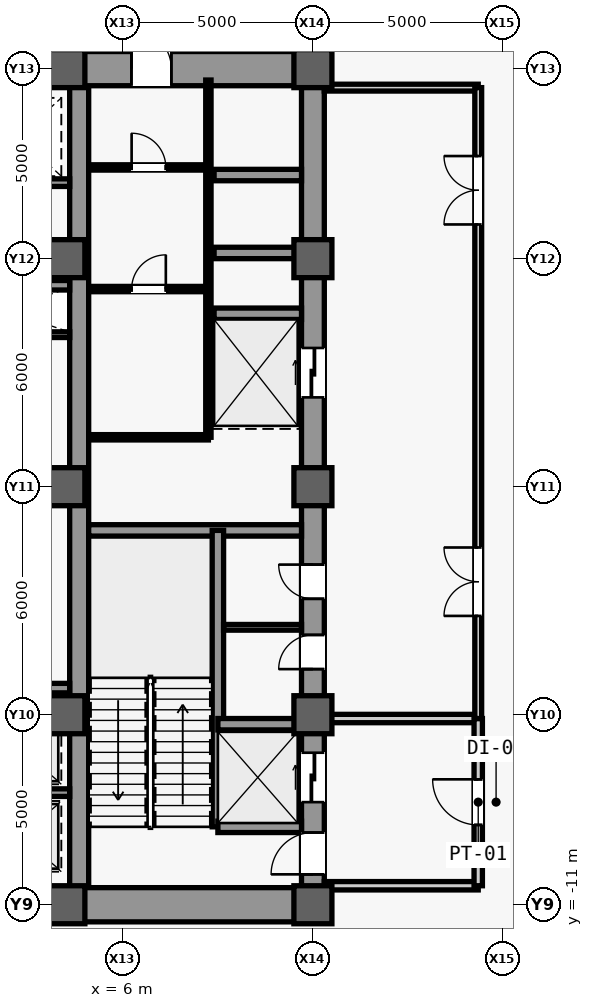
"""IFC4 building model, lengths in metres.
Left out: names, types, materials, properties, quantities, classifications, styles, units other than length and angle.
Written with IfcOpenShell. Run it as: python <this file> out.ifc"""

import sys

from ifc_helpers import new_model, si_unit, direction, frame, frame_2d, origin, origin_2d, place, context, subcontext, project, spatial, rectangle, extrude, source, transform, mapped, element, fill, save


model = new_model("IFC4")
c1 = context("Model", 3, precision=1e-05, world=origin(), true_north=direction((0.0, 1.0)))
c2 = subcontext(c1, "Body", "Model", "MODEL_VIEW")
j1 = project(units=[si_unit("LENGTHUNIT", "METRE"), si_unit("PLANEANGLEUNIT", "RADIAN")], contexts=[c1])
p1 = place(None, origin())
s1 = spatial("IfcSite", under=j1, at=p1, CompositionType="ELEMENT")
p2 = place(p1, origin())
s2 = spatial("IfcBuilding", under=s1, at=p2, CompositionType="ELEMENT")
p3 = place(p2, frame((0.0, 0.0, 12.0)))
s3 = spatial("IfcBuildingStorey", under=s2, at=p3, CompositionType="ELEMENT", Elevation=12.0)
m1 = source(origin(), c2, "Body", "SweptSolid", [
    extrude(rectangle(XDim=22.0, YDim=0.6, at=frame_2d((11.0, 0.0))), origin(), (0.0, 0.0, 1.0), 5.08),
])
p4 = place(p3, frame((11.0, -11.0, 0.0), z_axis=(0.0, 0.0, 1.0), x_axis=(0.0, 1.0, 0.0)))
e1 = element("IfcWall", 1, at=p4, inside=s3, PredefinedType="SHEAR", context=c2, shape_type="MappedRepresentation", body=[
    mapped(m1, transform((0.0, 0.0, 0.0), scale=1.0)),
])
m2 = source(origin(), c2, "Body", "SweptSolid", [
    extrude(rectangle(XDim=1.1, YDim=2.2, at=frame_2d((0.55, 1.1))), frame((0.0, 0.31, 0.0), z_axis=(0.0, -1.0, 0.0), x_axis=(1.0, 0.0, 0.0)), (0.0, 0.0, 1.0), 0.62),
])
p5 = place(p4, frame((0.8, 0.0, 0.0)))
e2 = element("IfcOpeningElement", 2, at=p5, cuts=e1, PredefinedType="OPENING", context=c2, shape_type="MappedRepresentation", body=[
    mapped(m2, transform((0.0, 0.0, 0.0), scale=1.0)),
])
m3 = source(origin(), c2, "Body", "SweptSolid", [
    extrude(rectangle(XDim=0.9, YDim=2.15, at=frame_2d((0.45, 1.075))), frame((0.0, 0.31, 0.0), z_axis=(0.0, -1.0, 0.0), x_axis=(1.0, 0.0, 0.0)), (0.0, 0.0, 1.0), 0.62),
])
p6 = place(p4, frame((6.2, 0.0, 0.0)))
e3 = element("IfcOpeningElement", 3, at=p6, cuts=e1, PredefinedType="OPENING", context=c2, shape_type="MappedRepresentation", body=[
    mapped(m3, transform((0.0, 0.0, 0.0), scale=1.0)),
])
p7 = place(p4, frame((8.05, 0.0, 0.0)))
e4 = element("IfcOpeningElement", 4, at=p7, cuts=e1, PredefinedType="OPENING", context=c2, shape_type="MappedRepresentation", body=[
    mapped(m3, transform((0.0, 0.0, 0.0), scale=1.0)),
])
m4 = source(origin(), c2, "Body", "SweptSolid", [
    extrude(rectangle(XDim=1.3, YDim=2.3, at=frame_2d((0.65, 1.15))), frame((0.0, 0.31, 0.0), z_axis=(0.0, -1.0, 0.0), x_axis=(1.0, 0.0, 0.0)), (0.0, 0.0, 1.0), 0.62),
])
p8 = place(p4, frame((2.7, 0.0, 0.0)))
e5 = element("IfcOpeningElement", 5, at=p8, cuts=e1, PredefinedType="OPENING", context=c2, shape_type="MappedRepresentation", body=[
    mapped(m4, transform((0.0, 0.0, 0.0), scale=1.0)),
])
p9 = place(p4, frame((13.35, 0.0, 0.0)))
e6 = element("IfcOpeningElement", 6, at=p9, cuts=e1, PredefinedType="OPENING", context=c2, shape_type="MappedRepresentation", body=[
    mapped(m4, transform((0.0, 0.0, 0.0), scale=1.0)),
])
m5 = source(origin(), c2, "Body", "SweptSolid", [
    extrude(rectangle(XDim=21.4, YDim=0.5, at=frame_2d((10.7, 0.0))), origin(), (0.0, 0.0, 1.0), 5.08),
])
p10 = place(p3, frame((4.85, -10.7, 0.0), z_axis=(0.0, 0.0, 1.0), x_axis=(0.0, 1.0, 0.0)))
e7 = element("IfcWall", 7, at=p10, inside=s3, PredefinedType="SHEAR", context=c2, shape_type="MappedRepresentation", body=[
    mapped(m5, transform((0.0, 0.0, 0.0), scale=1.0)),
])
m6 = source(origin(), c2, "Body", "SweptSolid", [
    extrude(rectangle(XDim=5.85, YDim=0.9, at=frame_2d((2.925, 0.0))), origin(), (0.0, 0.0, 1.0), 5.08),
])
p11 = place(p3, frame((4.85, -11.0, 0.0), z_axis=(0.0, 0.0, 1.0), x_axis=(1.0, 0.0, 0.0)))
e8 = element("IfcWall", 8, at=p11, inside=s3, PredefinedType="SHEAR", context=c2, shape_type="MappedRepresentation", body=[
    mapped(m6, transform((0.0, 0.0, 0.0), scale=1.0)),
])
p12 = place(p3, frame((4.85, 11.0, 0.0), z_axis=(0.0, 0.0, 1.0), x_axis=(1.0, 0.0, 0.0)))
e9 = element("IfcWall", 9, at=p12, inside=s3, PredefinedType="SHEAR", context=c2, shape_type="MappedRepresentation", body=[
    mapped(m6, transform((0.0, 0.0, 0.0), scale=1.0)),
])
m7 = source(origin(), c2, "Body", "SweptSolid", [
    extrude(rectangle(XDim=1.05, YDim=2.2, at=frame_2d((0.525, 1.1))), frame((0.0, 0.46, 0.0), z_axis=(0.0, -1.0, 0.0), x_axis=(1.0, 0.0, 0.0)), (0.0, 0.0, 1.0), 0.92),
])
p13 = place(p12, frame((1.375, 0.0, 0.0)))
e10 = element("IfcOpeningElement", 10, at=p13, cuts=e9, PredefinedType="OPENING", context=c2, shape_type="MappedRepresentation", body=[
    mapped(m7, transform((0.0, 0.0, 0.0), scale=1.0)),
])
m8 = source(origin(), c2, "Body", "SweptSolid", [
    extrude(rectangle(XDim=5.6, YDim=0.3, at=frame_2d((2.8, 0.0))), origin(), (0.0, 0.0, 1.0), 5.08),
])
p14 = place(p3, frame((5.1, -1.15, 0.0), z_axis=(0.0, 0.0, 1.0), x_axis=(1.0, 0.0, 0.0)))
e11 = element("IfcWall", 11, at=p14, inside=s3, PredefinedType="SHEAR", context=c2, shape_type="MappedRepresentation", body=[
    mapped(m8, transform((0.0, 0.0, 0.0), scale=1.0)),
])
m9 = source(origin(), c2, "Body", "SweptSolid", [
    extrude(rectangle(XDim=9.2, YDim=0.5, at=frame_2d((4.6, 0.0))), origin(), (0.0, 0.0, 1.0), 5.08),
])
p15 = place(p3, frame((-4.6, -11.0, 0.0), z_axis=(0.0, 0.0, 1.0), x_axis=(1.0, 0.0, 0.0)))
e12 = element("IfcWall", 12, at=p15, inside=s3, PredefinedType="SHEAR", context=c2, shape_type="MappedRepresentation", body=[
    mapped(m9, transform((0.0, 0.0, 0.0), scale=1.0)),
])
m10 = source(origin(), c2, "Body", "SweptSolid", [
    extrude(rectangle(XDim=1.8, YDim=2.25, at=frame_2d((0.9, 1.125))), frame((0.0, 0.26, 0.0), z_axis=(0.0, -1.0, 0.0), x_axis=(1.0, 0.0, 0.0)), (0.0, 0.0, 1.0), 0.52),
])
p16 = place(p15, frame((3.7, 0.0, 0.0)))
e13 = element("IfcOpeningElement", 13, at=p16, cuts=e12, PredefinedType="OPENING", context=c2, shape_type="MappedRepresentation", body=[
    mapped(m10, transform((0.0, 0.0, 0.0), scale=1.0)),
])
p17 = place(p3, frame((-4.6, 11.0, 0.0), z_axis=(0.0, 0.0, 1.0), x_axis=(1.0, 0.0, 0.0)))
e14 = element("IfcWall", 14, at=p17, inside=s3, PredefinedType="SHEAR", context=c2, shape_type="MappedRepresentation", body=[
    mapped(m9, transform((0.0, 0.0, 0.0), scale=1.0)),
])
p18 = place(p17, frame((3.7, 0.0, 0.0)))
e15 = element("IfcOpeningElement", 15, at=p18, cuts=e14, PredefinedType="OPENING", context=c2, shape_type="MappedRepresentation", body=[
    mapped(m10, transform((0.0, 0.0, 0.0), scale=1.0)),
])
m11 = source(origin(), c2, "Body", "SweptSolid", [
    extrude(rectangle(XDim=1.0, YDim=1.0, at=origin_2d()), origin(), (0.0, 0.0, 1.0), 5.4),
])
for number, where, z_axis, x_axis in (
    (16, (4.5, -11.0, 0.0), (0.0, 0.0, 1.0), (1.0, 0.0, 0.0)),
    (17, (4.5, -6.0, 0.0), (0.0, 0.0, 1.0), (1.0, 0.0, 0.0)),
    (18, (4.5, 0.0, 0.0), (0.0, 0.0, 1.0), (1.0, 0.0, 0.0)),
    (19, (4.5, 6.0, 0.0), (0.0, 0.0, 1.0), (1.0, 0.0, 0.0)),
    (20, (4.5, 11.0, 0.0), (0.0, 0.0, 1.0), (1.0, 0.0, 0.0)),
    (21, (11.0, -11.0, 0.0), (0.0, 0.0, 1.0), (1.0, 0.0, 0.0)),
    (22, (11.0, -6.0, 0.0), (0.0, 0.0, 1.0), (1.0, 0.0, 0.0)),
    (23, (11.0, 0.0, 0.0), (0.0, 0.0, 1.0), (1.0, 0.0, 0.0)),
    (24, (11.0, 6.0, 0.0), (0.0, 0.0, 1.0), (1.0, 0.0, 0.0)),
    (25, (11.0, 11.0, 0.0), (0.0, 0.0, 1.0), (1.0, 0.0, 0.0)),
):
    element("IfcColumn", number, at=place(p3, frame(where, z_axis=z_axis, x_axis=x_axis)), inside=s3, PredefinedType="COLUMN", context=c2, shape_type="MappedRepresentation", body=[
        mapped(m11, transform((0.0, 0.0, 0.0), scale=1.0)),
    ])
m12 = source(origin(), c2, "Body", "SweptSolid", [
    extrude(rectangle(XDim=7.8, YDim=0.3, at=frame_2d((3.9, 0.0))), origin(), (0.0, 0.0, 1.0), 5.08),
])
p19 = place(p3, frame((8.5, -8.95, 0.0), z_axis=(0.0, 0.0, 1.0), x_axis=(0.0, 1.0, 0.0)))
e26 = element("IfcWall", 26, at=p19, inside=s3, PredefinedType="SHEAR", context=c2, shape_type="MappedRepresentation", body=[
    mapped(m12, transform((0.0, 0.0, 0.0), scale=1.0)),
])
m13 = source(origin(), c2, "Body", "SweptSolid", [
    extrude(rectangle(XDim=2.2, YDim=0.3, at=frame_2d((1.1, 0.0))), origin(), (0.0, 0.0, 1.0), 5.08),
])
for number, where, z_axis, x_axis in (
    (27, (8.5, -8.95, 0.0), (0.0, 0.0, 1.0), (1.0, 0.0, 0.0)),
    (28, (8.5, -6.25, 0.0), (0.0, 0.0, 1.0), (1.0, 0.0, 0.0)),
):
    element("IfcWall", number, at=place(p3, frame(where, z_axis=z_axis, x_axis=x_axis)), inside=s3, PredefinedType="SHEAR", context=c2, shape_type="MappedRepresentation", body=[
        mapped(m13, transform((0.0, 0.0, 0.0), scale=1.0)),
    ])
m14 = source(origin(), c2, "Body", "SweptSolid", [
    extrude(rectangle(XDim=2.3, YDim=0.3, at=frame_2d((1.15, 0.0))), origin(), (0.0, 0.0, 1.0), 5.08),
])
for number, where, z_axis, x_axis in (
    (29, (8.4, 4.55, 0.0), (0.0, 0.0, 1.0), (1.0, 0.0, 0.0)),
    (30, (8.4, 6.15, 0.0), (0.0, 0.0, 1.0), (1.0, 0.0, 0.0)),
    (31, (8.4, 8.2, 0.0), (0.0, 0.0, 1.0), (1.0, 0.0, 0.0)),
):
    element("IfcWall", number, at=place(p3, frame(where, z_axis=z_axis, x_axis=x_axis)), inside=s3, PredefinedType="SHEAR", context=c2, shape_type="MappedRepresentation", body=[
        mapped(m14, transform((0.0, 0.0, 0.0), scale=1.0)),
    ])
m15 = source(origin(), c2, "Body", "SweptSolid", [
    extrude(rectangle(XDim=2.05, YDim=0.15, at=frame_2d((1.025, 0.0))), origin(), (0.0, 0.0, 1.0), 5.08),
])
p20 = place(p3, frame((8.65, -3.7, 0.0), z_axis=(0.0, 0.0, 1.0), x_axis=(1.0, 0.0, 0.0)))
e32 = element("IfcWall", 32, at=p20, inside=s3, PredefinedType="PARTITIONING", context=c2, shape_type="MappedRepresentation", body=[
    mapped(m15, transform((0.0, 0.0, 0.0), scale=1.0)),
])
m16 = source(origin(), c2, "Body", "SweptSolid", [
    extrude(rectangle(XDim=9.4, YDim=0.14, at=frame_2d((4.7, 0.0))), origin(), (0.0, 0.0, 1.0), 5.08),
])
p21 = place(p3, frame((8.25, 1.3, 0.0), z_axis=(0.0, 0.0, 1.0), x_axis=(0.0, 1.0, 0.0)))
e33 = element("IfcWall", 33, at=p21, inside=s3, PredefinedType="PARTITIONING", context=c2, shape_type="MappedRepresentation", body=[
    mapped(m16, transform((0.0, 0.0, 0.0), scale=1.0)),
])
m17 = source(origin(), c2, "Body", "SweptSolid", [
    extrude(rectangle(XDim=3.15, YDim=0.14, at=frame_2d((1.575, 0.0))), origin(), (0.0, 0.0, 1.0), 5.08),
])
p22 = place(p3, frame((5.1, 1.3, 0.0), z_axis=(0.0, 0.0, 1.0), x_axis=(1.0, 0.0, 0.0)))
e34 = element("IfcWall", 34, at=p22, inside=s3, PredefinedType="PARTITIONING", context=c2, shape_type="MappedRepresentation", body=[
    mapped(m17, transform((0.0, 0.0, 0.0), scale=1.0)),
])
p23 = place(p3, frame((5.1, 8.4, 0.0), z_axis=(0.0, 0.0, 1.0), x_axis=(1.0, 0.0, 0.0)))
e35 = element("IfcWall", 35, at=p23, inside=s3, PredefinedType="PARTITIONING", context=c2, shape_type="MappedRepresentation", body=[
    mapped(m17, transform((0.0, 0.0, 0.0), scale=1.0)),
])
m18 = source(origin(), c2, "Body", "SweptSolid", [
    extrude(rectangle(XDim=0.9, YDim=2.15, at=frame_2d((0.45, 1.075))), frame((0.0, 0.08, 0.0), z_axis=(0.0, -1.0, 0.0), x_axis=(1.0, 0.0, 0.0)), (0.0, 0.0, 1.0), 0.16),
])
p24 = place(p23, frame((1.13, 0.0, 0.0)))
e36 = element("IfcOpeningElement", 36, at=p24, cuts=e35, PredefinedType="OPENING", context=c2, shape_type="MappedRepresentation", body=[
    mapped(m18, transform((0.0, 0.0, 0.0), scale=1.0)),
])
p25 = place(p3, frame((5.1, 5.2, 0.0), z_axis=(0.0, 0.0, 1.0), x_axis=(1.0, 0.0, 0.0)))
e37 = element("IfcWall", 37, at=p25, inside=s3, PredefinedType="PARTITIONING", context=c2, shape_type="MappedRepresentation", body=[
    mapped(m17, transform((0.0, 0.0, 0.0), scale=1.0)),
])
p26 = place(p25, frame((1.13, 0.0, 0.0)))
e38 = element("IfcOpeningElement", 38, at=p26, cuts=e37, PredefinedType="OPENING", context=c2, shape_type="MappedRepresentation", body=[
    mapped(m18, transform((0.0, 0.0, 0.0), scale=1.0)),
])
m19 = source(origin(), c2, "Body", "SweptSolid", [
    extrude(rectangle(XDim=4.05, YDim=0.22, at=frame_2d((2.025, 0.0))), origin(), (0.0, 0.0, 1.0), 5.08),
])
for number, where, z_axis, x_axis in (
    (39, (11.3, -10.5, 0.0), (0.0, 0.0, 1.0), (1.0, 0.0, 0.0)),
    (40, (11.3, -6.1, 0.0), (0.0, 0.0, 1.0), (1.0, 0.0, 0.0)),
):
    element("IfcWall", number, at=place(p3, frame(where, z_axis=z_axis, x_axis=x_axis)), inside=s3, PredefinedType="PARTITIONING", context=c2, shape_type="MappedRepresentation", body=[
        mapped(m19, transform((0.0, 0.0, 0.0), scale=1.0)),
    ])
m20 = source(origin(), c2, "Body", "SweptSolid", [
    extrude(rectangle(XDim=4.4, YDim=0.22, at=frame_2d((2.2, 0.0))), origin(), (0.0, 0.0, 1.0), 5.08),
])
p27 = place(p3, frame((15.35, -10.5, 0.0), z_axis=(0.0, 0.0, 1.0), x_axis=(0.0, 1.0, 0.0)))
e41 = element("IfcWall", 41, at=p27, inside=s3, PredefinedType="PARTITIONING", context=c2, shape_type="MappedRepresentation", body=[
    mapped(m20, transform((0.0, 0.0, 0.0), scale=1.0)),
])
m21 = source(origin(), c2, "Body", "SweptSolid", [
    extrude(rectangle(XDim=1.2, YDim=2.2, at=frame_2d((0.6, 1.1))), frame((0.0, 0.12, 0.0), z_axis=(0.0, -1.0, 0.0), x_axis=(1.0, 0.0, 0.0)), (0.0, 0.0, 1.0), 0.24),
])
p28 = place(p27, frame((1.6, 0.0, 0.0)))
e42 = element("IfcOpeningElement", 42, at=p28, cuts=e41, PredefinedType="OPENING", context=c2, shape_type="MappedRepresentation", body=[
    mapped(m21, transform((0.0, 0.0, 0.0), scale=1.0)),
])
m22 = source(origin(), c2, "Body", "SweptSolid", [
    extrude(rectangle(XDim=4.05, YDim=0.18, at=frame_2d((2.025, 0.0))), origin(), (0.0, 0.0, 1.0), 5.08),
])
p29 = place(p3, frame((11.3, 10.5, 0.0), z_axis=(0.0, 0.0, 1.0), x_axis=(1.0, 0.0, 0.0)))
e43 = element("IfcWall", 43, at=p29, inside=s3, PredefinedType="PARTITIONING", context=c2, shape_type="MappedRepresentation", body=[
    mapped(m22, transform((0.0, 0.0, 0.0), scale=1.0)),
])
m23 = source(origin(), c2, "Body", "SweptSolid", [
    extrude(rectangle(XDim=16.6, YDim=0.18, at=frame_2d((8.3, 0.0))), origin(), (0.0, 0.0, 1.0), 5.08),
])
p30 = place(p3, frame((15.35, -6.1, 0.0), z_axis=(0.0, 0.0, 1.0), x_axis=(0.0, 1.0, 0.0)))
e44 = element("IfcWall", 44, at=p30, inside=s3, PredefinedType="PARTITIONING", context=c2, shape_type="MappedRepresentation", body=[
    mapped(m23, transform((0.0, 0.0, 0.0), scale=1.0)),
])
m24 = source(origin(), c2, "Body", "SweptSolid", [
    extrude(rectangle(XDim=1.8, YDim=2.25, at=frame_2d((0.9, 1.125))), frame((0.0, 0.1, 0.0), z_axis=(0.0, -1.0, 0.0), x_axis=(1.0, 0.0, 0.0)), (0.0, 0.0, 1.0), 0.2),
])
p31 = place(p30, frame((2.7, 0.0, 0.0)))
e45 = element("IfcOpeningElement", 45, at=p31, cuts=e44, PredefinedType="OPENING", context=c2, shape_type="MappedRepresentation", body=[
    mapped(m24, transform((0.0, 0.0, 0.0), scale=1.0)),
])
p32 = place(p30, frame((13.0, 0.0, 0.0)))
e46 = element("IfcOpeningElement", 46, at=p32, cuts=e44, PredefinedType="OPENING", context=c2, shape_type="MappedRepresentation", body=[
    mapped(m24, transform((0.0, 0.0, 0.0), scale=1.0)),
])
m25 = source(origin(), c2, "Body", "SweptSolid", [
    extrude(rectangle(XDim=3.45, YDim=0.15, at=frame_2d((1.725, 0.0))), origin(), (0.0, 0.0, 1.0), 5.08),
])
p33 = place(p3, frame((1.15, 4.0, 0.0), z_axis=(0.0, 0.0, 1.0), x_axis=(1.0, 0.0, 0.0)))
e47 = element("IfcWall", 47, at=p33, inside=s3, PredefinedType="PARTITIONING", context=c2, shape_type="MappedRepresentation", body=[
    mapped(m25, transform((0.0, 0.0, 0.0), scale=1.0)),
])
m26 = source(origin(), c2, "Body", "SweptSolid", [
    extrude(rectangle(XDim=2.45, YDim=0.2, at=frame_2d((1.225, 0.0))), origin(), (0.0, 0.0, 1.0), 5.08),
])
p34 = place(p3, frame((2.15, -8.05, 0.0), z_axis=(0.0, 0.0, 1.0), x_axis=(1.0, 0.0, 0.0)))
e48 = element("IfcWall", 48, at=p34, inside=s3, PredefinedType="SHEAR", context=c2, shape_type="MappedRepresentation", body=[
    mapped(m26, transform((0.0, 0.0, 0.0), scale=1.0)),
])
m27 = source(origin(), c2, "Body", "SweptSolid", [
    extrude(rectangle(XDim=9.2, YDim=0.25, at=frame_2d((4.6, 0.0))), origin(), (0.0, 0.0, 1.0), 5.08),
])
p35 = place(p3, frame((-4.6, -5.3, 0.0), z_axis=(0.0, 0.0, 1.0), x_axis=(1.0, 0.0, 0.0)))
e49 = element("IfcWall", 49, at=p35, inside=s3, PredefinedType="SHEAR", context=c2, shape_type="MappedRepresentation", body=[
    mapped(m27, transform((0.0, 0.0, 0.0), scale=1.0)),
])
m28 = source(origin(), c2, "Body", "SweptSolid", [
    extrude(rectangle(XDim=1.05, YDim=2.2, at=frame_2d((0.525, 1.1))), frame((0.0, 0.135, 0.0), z_axis=(0.0, -1.0, 0.0), x_axis=(1.0, 0.0, 0.0)), (0.0, 0.0, 1.0), 0.27),
])
p36 = place(p35, frame((4.075, 0.0, 0.0)))
e50 = element("IfcOpeningElement", 50, at=p36, cuts=e49, PredefinedType="OPENING", context=c2, shape_type="MappedRepresentation", body=[
    mapped(m28, transform((0.0, 0.0, 0.0), scale=1.0)),
])
p37 = place(p3, frame((2.15, 8.0, 0.0), z_axis=(0.0, 0.0, 1.0), x_axis=(1.0, 0.0, 0.0)))
e51 = element("IfcWall", 51, at=p37, inside=s3, PredefinedType="SHEAR", context=c2, shape_type="MappedRepresentation", body=[
    mapped(m26, transform((0.0, 0.0, 0.0), scale=1.0)),
])
p38 = place(p3, frame((-4.6, 5.3, 0.0), z_axis=(0.0, 0.0, 1.0), x_axis=(1.0, 0.0, 0.0)))
e52 = element("IfcWall", 52, at=p38, inside=s3, PredefinedType="SHEAR", context=c2, shape_type="MappedRepresentation", body=[
    mapped(m27, transform((0.0, 0.0, 0.0), scale=1.0)),
])
p39 = place(p38, frame((4.075, 0.0, 0.0)))
e53 = element("IfcOpeningElement", 53, at=p39, cuts=e52, PredefinedType="OPENING", context=c2, shape_type="MappedRepresentation", body=[
    mapped(m28, transform((0.0, 0.0, 0.0), scale=1.0)),
])
m29 = source(origin(), c2, "Body", "SweptSolid", [
    extrude(rectangle(XDim=1.1, YDim=2.2, at=frame_2d((0.55, 1.1))), frame((0.0, 0.025, 0.0), z_axis=(0.0, -1.0, 0.0), x_axis=(1.0, 0.0, 0.0)), (0.0, 0.0, 1.0), 0.05),
])
p40 = place(p5, origin())
e54 = element("IfcDoor", 54, at=p40, inside=s3, OperationType="SINGLE_SWING_LEFT", PredefinedType="DOOR", context=c2, shape_type="MappedRepresentation", body=[
    mapped(m29, transform((0.0, 0.0, 0.0), scale=1.0)),
])
fill(e2, e54)
m30 = source(origin(), c2, "Body", "SweptSolid", [
    extrude(rectangle(XDim=0.9, YDim=2.15, at=frame_2d((0.45, 1.075))), frame((0.0, 0.025, 0.0), z_axis=(0.0, -1.0, 0.0), x_axis=(1.0, 0.0, 0.0)), (0.0, 0.0, 1.0), 0.05),
])
p41 = place(p6, origin())
e55 = element("IfcDoor", 55, at=p41, inside=s3, OperationType="SINGLE_SWING_LEFT", PredefinedType="DOOR", context=c2, shape_type="MappedRepresentation", body=[
    mapped(m30, transform((0.0, 0.0, 0.0), scale=1.0)),
])
fill(e3, e55)
p42 = place(p7, origin())
e56 = element("IfcDoor", 56, at=p42, inside=s3, OperationType="SINGLE_SWING_RIGHT", PredefinedType="DOOR", context=c2, shape_type="MappedRepresentation", body=[
    mapped(m30, transform((0.0, 0.0, 0.0), scale=1.0)),
])
fill(e4, e56)
m31 = source(origin(), c2, "Body", "SweptSolid", [
    extrude(rectangle(XDim=1.05, YDim=2.2, at=frame_2d((0.525, 1.1))), frame((0.0, 0.025, 0.0), z_axis=(0.0, -1.0, 0.0), x_axis=(1.0, 0.0, 0.0)), (0.0, 0.0, 1.0), 0.05),
])
p43 = place(p13, origin())
e57 = element("IfcDoor", 57, at=p43, inside=s3, OperationType="SINGLE_SWING_LEFT", PredefinedType="DOOR", context=c2, shape_type="MappedRepresentation", body=[
    mapped(m31, transform((0.0, 0.0, 0.0), scale=1.0)),
])
fill(e10, e57)
p44 = place(p24, origin())
e58 = element("IfcDoor", 58, at=p44, inside=s3, OperationType="SINGLE_SWING_LEFT", PredefinedType="DOOR", context=c2, shape_type="MappedRepresentation", body=[
    mapped(m30, transform((0.0, 0.0, 0.0), scale=1.0)),
])
fill(e36, e58)
p45 = place(p26, origin())
e59 = element("IfcDoor", 59, at=p45, inside=s3, OperationType="SINGLE_SWING_RIGHT", PredefinedType="DOOR", context=c2, shape_type="MappedRepresentation", body=[
    mapped(m30, transform((0.0, 0.0, 0.0), scale=1.0)),
])
fill(e38, e59)
m32 = source(origin(), c2, "Body", "SweptSolid", [
    extrude(rectangle(XDim=1.2, YDim=2.2, at=frame_2d((0.6, 1.1))), frame((0.0, 0.025, 0.0), z_axis=(0.0, -1.0, 0.0), x_axis=(1.0, 0.0, 0.0)), (0.0, 0.0, 1.0), 0.05),
])
p46 = place(p28, origin())
e60 = element("IfcDoor", 60, at=p46, inside=s3, OperationType="SINGLE_SWING_RIGHT", PredefinedType="DOOR", context=c2, shape_type="MappedRepresentation", body=[
    mapped(m32, transform((0.0, 0.0, 0.0), scale=1.0)),
])
fill(e42, e60)
m33 = source(origin(), c2, "Body", "SweptSolid", [
    extrude(rectangle(XDim=1.8, YDim=2.25, at=frame_2d((0.9, 1.125))), frame((0.0, 0.025, 0.0), z_axis=(0.0, -1.0, 0.0), x_axis=(1.0, 0.0, 0.0)), (0.0, 0.0, 1.0), 0.05),
])
p47 = place(p31, origin())
e61 = element("IfcDoor", 61, at=p47, inside=s3, OperationType="SINGLE_SWING_RIGHT", PredefinedType="DOOR", context=c2, shape_type="MappedRepresentation", body=[
    mapped(m33, transform((0.0, 0.0, 0.0), scale=1.0)),
])
fill(e45, e61)
p48 = place(p32, origin())
e62 = element("IfcDoor", 62, at=p48, inside=s3, OperationType="SINGLE_SWING_LEFT", PredefinedType="DOOR", context=c2, shape_type="MappedRepresentation", body=[
    mapped(m33, transform((0.0, 0.0, 0.0), scale=1.0)),
])
fill(e46, e62)
m34 = source(origin(), c2, "Body", "SweptSolid", [
    extrude(rectangle(XDim=1.3, YDim=2.3, at=frame_2d((0.65, 1.15))), frame((0.0, 0.025, 0.0), z_axis=(0.0, -1.0, 0.0), x_axis=(1.0, 0.0, 0.0)), (0.0, 0.0, 1.0), 0.05),
])
p49 = place(p8, origin())
e63 = element("IfcDoor", 63, at=p49, inside=s3, OperationType="SLIDING_TO_LEFT", PredefinedType="DOOR", context=c2, shape_type="MappedRepresentation", body=[
    mapped(m34, transform((0.0, 0.0, 0.0), scale=1.0)),
])
fill(e5, e63)
p50 = place(p9, origin())
e64 = element("IfcDoor", 64, at=p50, inside=s3, OperationType="SLIDING_TO_LEFT", PredefinedType="DOOR", context=c2, shape_type="MappedRepresentation", body=[
    mapped(m34, transform((0.0, 0.0, 0.0), scale=1.0)),
])
fill(e6, e64)
save(model, sys.argv[1])
